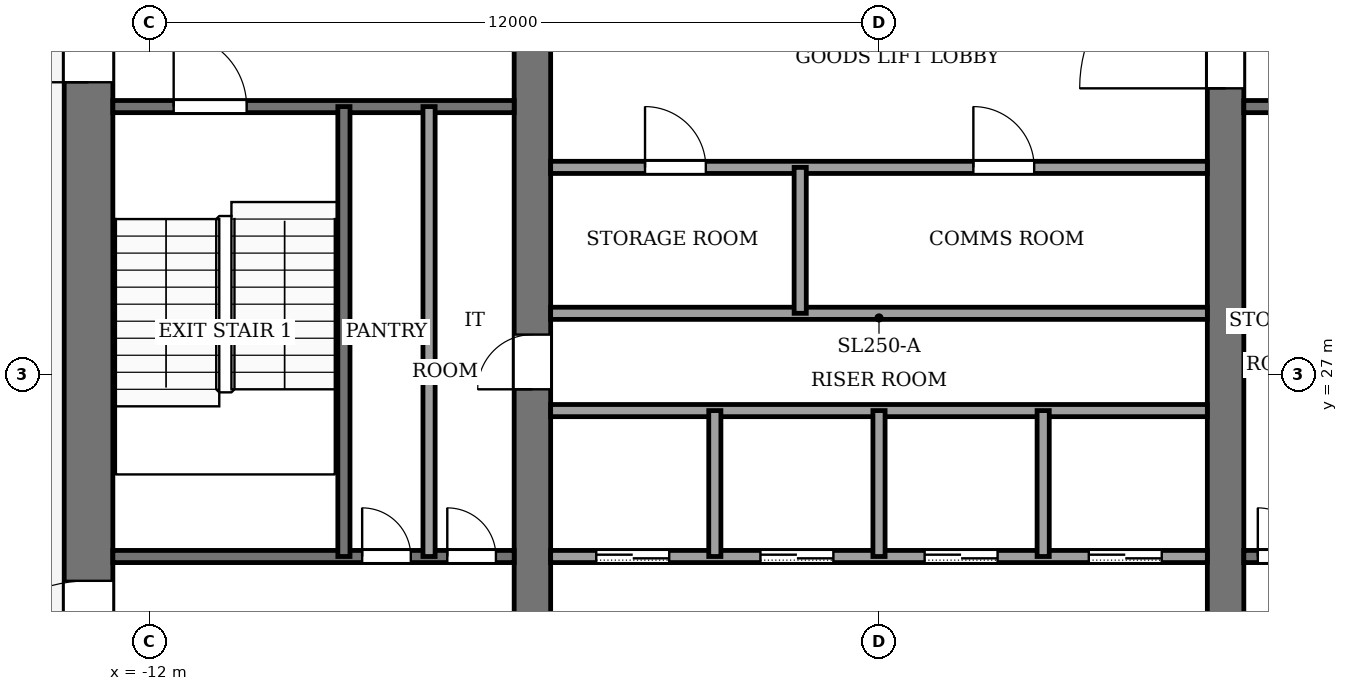
"""IFC4 building model, lengths in metres.
Left out: names, types, materials, properties, quantities, classifications, styles, units other than length and angle.
Written with IfcOpenShell. Run it as: python <this file> out.ifc"""

import sys

from ifc_helpers import new_model, si_unit, direction, frame, frame_2d, origin, place, context, subcontext, project, spatial, rectangle, extrude, element, fill, save


model = new_model("IFC4")
c1 = context("Model", 3, precision=1e-05, world=origin(), true_north=direction((0.0, 1.0)))
c2 = subcontext(c1, "Body", "Model", "MODEL_VIEW")
j1 = project(units=[si_unit("LENGTHUNIT", "METRE"), si_unit("PLANEANGLEUNIT", "RADIAN")], contexts=[c1])
p1 = place(None, origin())
s1 = spatial("IfcSite", under=j1, at=p1, CompositionType="ELEMENT")
p2 = place(p1, origin())
s2 = spatial("IfcBuilding", under=s1, at=p2, CompositionType="ELEMENT")
p3 = place(p2, frame((0.0, 0.0, 250.0)))
s3 = spatial("IfcBuildingStorey", under=s2, at=p3, CompositionType="ELEMENT", Elevation=250.0)
p4 = place(p3, frame((-13.0, 18.4, -0.13), z_axis=(0.0, 0.0, 1.0), x_axis=(0.0, 1.0, 0.0)))
e1 = element("IfcWall", 1, at=p4, inside=s3, PredefinedType="SHEAR", context=c2, shape_type="SweptSolid", body=[
    extrude(rectangle(XDim=19.2, YDim=0.8, at=frame_2d((9.6, 0.0))), origin(), (0.0, 0.0, 1.0), 4.0),
])
p5 = place(p4, frame((2.8, 0.0, 0.13)))
e2 = element("IfcOpeningElement", 2, at=p5, cuts=e1, PredefinedType="OPENING", context=c2, shape_type="SweptSolid", body=[
    extrude(rectangle(XDim=2.4, YDim=2.4, at=frame_2d((1.2, 1.2))), frame((0.0, 0.41, 0.0), z_axis=(0.0, -1.0, 0.0), x_axis=(1.0, 0.0, 0.0)), (0.0, 0.0, 1.0), 0.82),
])
p6 = place(p4, frame((13.4, 0.0, 0.13)))
e3 = element("IfcOpeningElement", 3, at=p6, cuts=e1, PredefinedType="OPENING", context=c2, shape_type="SweptSolid", body=[
    extrude(rectangle(XDim=1.4, YDim=2.2, at=frame_2d((0.7, 1.1))), frame((0.0, 0.41, 0.0), z_axis=(0.0, -1.0, 0.0), x_axis=(1.0, 0.0, 0.0)), (0.0, 0.0, 1.0), 0.82),
])
p7 = place(p3, frame((-5.7, 18.4, -0.13), z_axis=(0.0, 0.0, 1.0), x_axis=(0.0, 1.0, 0.0)))
e4 = element("IfcWall", 4, at=p7, inside=s3, PredefinedType="SHEAR", context=c2, shape_type="SweptSolid", body=[
    extrude(rectangle(XDim=19.2, YDim=0.6, at=frame_2d((9.6, 0.0))), origin(), (0.0, 0.0, 1.0), 4.0),
])
p8 = place(p7, frame((8.35, 0.0, 0.13)))
e5 = element("IfcOpeningElement", 5, at=p8, cuts=e4, PredefinedType="OPENING", context=c2, shape_type="SweptSolid", body=[
    extrude(rectangle(XDim=0.9, YDim=2.1, at=frame_2d((0.45, 1.05))), frame((0.0, 0.31, 0.0), z_axis=(0.0, -1.0, 0.0), x_axis=(1.0, 0.0, 0.0)), (0.0, 0.0, 1.0), 0.62),
])
p9 = place(p3, frame((5.7, 18.4, -0.13), z_axis=(0.0, 0.0, 1.0), x_axis=(0.0, 1.0, 0.0)))
e6 = element("IfcWall", 6, at=p9, inside=s3, PredefinedType="SHEAR", context=c2, shape_type="SweptSolid", body=[
    extrude(rectangle(XDim=19.2, YDim=0.6, at=frame_2d((9.6, 0.0))), origin(), (0.0, 0.0, 1.0), 4.0),
])
p10 = place(p9, frame((13.3, 0.0, 0.13)))
e7 = element("IfcOpeningElement", 7, at=p10, cuts=e6, PredefinedType="OPENING", context=c2, shape_type="SweptSolid", body=[
    extrude(rectangle(XDim=2.4, YDim=2.4, at=frame_2d((1.2, 1.2))), frame((0.0, 0.31, 0.0), z_axis=(0.0, -1.0, 0.0), x_axis=(1.0, 0.0, 0.0)), (0.0, 0.0, 1.0), 0.62),
])
p11 = place(p3, frame((-12.6, 24.0, 0.0), z_axis=(0.0, 0.0, 1.0), x_axis=(1.0, 0.0, 0.0)))
e8 = element("IfcWall", 8, at=p11, inside=s3, PredefinedType="PARTITIONING", context=c2, shape_type="SweptSolid", body=[
    extrude(rectangle(XDim=6.6, YDim=0.2, at=frame_2d((3.3, 0.0))), origin(), (0.0, 0.0, 1.0), 3.87),
])
p12 = place(p11, frame((4.1, 0.0, 0.0)))
e9 = element("IfcOpeningElement", 9, at=p12, cuts=e8, PredefinedType="OPENING", context=c2, shape_type="SweptSolid", body=[
    extrude(rectangle(XDim=0.8, YDim=2.1, at=frame_2d((0.4, 1.05))), frame((0.0, 0.11, 0.0), z_axis=(0.0, -1.0, 0.0), x_axis=(1.0, 0.0, 0.0)), (0.0, 0.0, 1.0), 0.22),
])
p13 = place(p11, frame((5.5, 0.0, 0.0)))
e10 = element("IfcOpeningElement", 10, at=p13, cuts=e8, PredefinedType="OPENING", context=c2, shape_type="SweptSolid", body=[
    extrude(rectangle(XDim=0.8, YDim=2.1, at=frame_2d((0.4, 1.05))), frame((0.0, 0.11, 0.0), z_axis=(0.0, -1.0, 0.0), x_axis=(1.0, 0.0, 0.0)), (0.0, 0.0, 1.0), 0.22),
])
p14 = place(p3, frame((-5.4, 24.0, 0.0), z_axis=(0.0, 0.0, 1.0), x_axis=(1.0, 0.0, 0.0)))
e11 = element("IfcWall", 11, at=p14, inside=s3, PredefinedType="PARTITIONING", context=c2, shape_type="SweptSolid", body=[
    extrude(rectangle(XDim=10.8, YDim=0.2, at=frame_2d((5.4, 0.0))), origin(), (0.0, 0.0, 1.0), 3.87),
])
p15 = place(p14, frame((0.75, 0.0, 0.0)))
e12 = element("IfcOpeningElement", 12, at=p15, cuts=e11, PredefinedType="OPENING", context=c2, shape_type="SweptSolid", body=[
    extrude(rectangle(XDim=1.2, YDim=2.2, at=frame_2d((0.6, 1.1))), frame((0.0, 0.11, 0.0), z_axis=(0.0, -1.0, 0.0), x_axis=(1.0, 0.0, 0.0)), (0.0, 0.0, 1.0), 0.22),
])
p16 = place(p14, frame((3.45, 0.0, 0.0)))
e13 = element("IfcOpeningElement", 13, at=p16, cuts=e11, PredefinedType="OPENING", context=c2, shape_type="SweptSolid", body=[
    extrude(rectangle(XDim=1.2, YDim=2.2, at=frame_2d((0.6, 1.1))), frame((0.0, 0.11, 0.0), z_axis=(0.0, -1.0, 0.0), x_axis=(1.0, 0.0, 0.0)), (0.0, 0.0, 1.0), 0.22),
])
p17 = place(p14, frame((6.15, 0.0, 0.0)))
e14 = element("IfcOpeningElement", 14, at=p17, cuts=e11, PredefinedType="OPENING", context=c2, shape_type="SweptSolid", body=[
    extrude(rectangle(XDim=1.2, YDim=2.2, at=frame_2d((0.6, 1.1))), frame((0.0, 0.11, 0.0), z_axis=(0.0, -1.0, 0.0), x_axis=(1.0, 0.0, 0.0)), (0.0, 0.0, 1.0), 0.22),
])
p18 = place(p14, frame((8.85, 0.0, 0.0)))
e15 = element("IfcOpeningElement", 15, at=p18, cuts=e11, PredefinedType="OPENING", context=c2, shape_type="SweptSolid", body=[
    extrude(rectangle(XDim=1.2, YDim=2.2, at=frame_2d((0.6, 1.1))), frame((0.0, 0.11, 0.0), z_axis=(0.0, -1.0, 0.0), x_axis=(1.0, 0.0, 0.0)), (0.0, 0.0, 1.0), 0.22),
])
p19 = place(p3, frame((6.0, 24.0, 0.0), z_axis=(0.0, 0.0, 1.0), x_axis=(1.0, 0.0, 0.0)))
e16 = element("IfcWall", 16, at=p19, inside=s3, PredefinedType="PARTITIONING", context=c2, shape_type="SweptSolid", body=[
    extrude(rectangle(XDim=6.6, YDim=0.2, at=frame_2d((3.3, 0.0))), origin(), (0.0, 0.0, 1.0), 3.87),
])
p20 = place(p19, frame((0.23, 0.0, 0.0)))
e17 = element("IfcOpeningElement", 17, at=p20, cuts=e16, PredefinedType="OPENING", context=c2, shape_type="SweptSolid", body=[
    extrude(rectangle(XDim=0.8, YDim=2.1, at=frame_2d((0.4, 1.05))), frame((0.0, 0.11, 0.0), z_axis=(0.0, -1.0, 0.0), x_axis=(1.0, 0.0, 0.0)), (0.0, 0.0, 1.0), 0.22),
])
p21 = place(p19, frame((1.53, 0.0, 0.0)))
e18 = element("IfcOpeningElement", 18, at=p21, cuts=e16, PredefinedType="OPENING", context=c2, shape_type="SweptSolid", body=[
    extrude(rectangle(XDim=1.0, YDim=2.1, at=frame_2d((0.5, 1.05))), frame((0.0, 0.11, 0.0), z_axis=(0.0, -1.0, 0.0), x_axis=(1.0, 0.0, 0.0)), (0.0, 0.0, 1.0), 0.22),
])
p22 = place(p19, frame((4.4, 0.0, 0.0)))
e19 = element("IfcOpeningElement", 19, at=p22, cuts=e16, PredefinedType="OPENING", context=c2, shape_type="SweptSolid", body=[
    extrude(rectangle(XDim=1.2, YDim=2.2, at=frame_2d((0.6, 1.1))), frame((0.0, 0.11, 0.0), z_axis=(0.0, -1.0, 0.0), x_axis=(1.0, 0.0, 0.0)), (0.0, 0.0, 1.0), 0.22),
])
for number, where, z_axis, x_axis in (
    (20, (-5.4, 26.4, 0.0), (0.0, 0.0, 1.0), (1.0, 0.0, 0.0)),
    (21, (-5.4, 28.0, 0.0), (0.0, 0.0, 1.0), (1.0, 0.0, 0.0)),
):
    element("IfcWall", number, at=place(p3, frame(where, z_axis=z_axis, x_axis=x_axis)), inside=s3, PredefinedType="PARTITIONING", context=c2, shape_type="SweptSolid", body=[
        extrude(rectangle(XDim=10.8, YDim=0.2, at=frame_2d((5.4, 0.0))), origin(), (0.0, 0.0, 1.0), 3.87),
    ])
p23 = place(p3, frame((-5.4, 30.4, 0.0), z_axis=(0.0, 0.0, 1.0), x_axis=(1.0, 0.0, 0.0)))
e22 = element("IfcWall", 22, at=p23, inside=s3, PredefinedType="PARTITIONING", context=c2, shape_type="SweptSolid", body=[
    extrude(rectangle(XDim=10.8, YDim=0.2, at=frame_2d((5.4, 0.0))), origin(), (0.0, 0.0, 1.0), 3.87),
])
p24 = place(p23, frame((1.552, 0.0, 0.0)))
e23 = element("IfcOpeningElement", 23, at=p24, cuts=e22, PredefinedType="OPENING", context=c2, shape_type="SweptSolid", body=[
    extrude(rectangle(XDim=1.0, YDim=2.1, at=frame_2d((0.5, 1.05))), frame((0.0, 0.11, 0.0), z_axis=(0.0, -1.0, 0.0), x_axis=(1.0, 0.0, 0.0)), (0.0, 0.0, 1.0), 0.22),
])
p25 = place(p23, frame((6.952, 0.0, 0.0)))
e24 = element("IfcOpeningElement", 24, at=p25, cuts=e22, PredefinedType="OPENING", context=c2, shape_type="SweptSolid", body=[
    extrude(rectangle(XDim=1.0, YDim=2.1, at=frame_2d((0.5, 1.05))), frame((0.0, 0.11, 0.0), z_axis=(0.0, -1.0, 0.0), x_axis=(1.0, 0.0, 0.0)), (0.0, 0.0, 1.0), 0.22),
])
p26 = place(p3, frame((-12.6, 31.4, 0.0), z_axis=(0.0, 0.0, 1.0), x_axis=(1.0, 0.0, 0.0)))
e25 = element("IfcWall", 25, at=p26, inside=s3, PredefinedType="PARTITIONING", context=c2, shape_type="SweptSolid", body=[
    extrude(rectangle(XDim=6.6, YDim=0.2, at=frame_2d((3.3, 0.0))), origin(), (0.0, 0.0, 1.0), 3.87),
])
p27 = place(p26, frame((1.0, 0.0, 0.0)))
e26 = element("IfcOpeningElement", 26, at=p27, cuts=e25, PredefinedType="OPENING", context=c2, shape_type="SweptSolid", body=[
    extrude(rectangle(XDim=1.2, YDim=2.2, at=frame_2d((0.6, 1.1))), frame((0.0, 0.11, 0.0), z_axis=(0.0, -1.0, 0.0), x_axis=(1.0, 0.0, 0.0)), (0.0, 0.0, 1.0), 0.22),
])
p28 = place(p3, frame((6.0, 31.4, 0.0), z_axis=(0.0, 0.0, 1.0), x_axis=(1.0, 0.0, 0.0)))
e27 = element("IfcWall", 27, at=p28, inside=s3, PredefinedType="PARTITIONING", context=c2, shape_type="SweptSolid", body=[
    extrude(rectangle(XDim=6.6, YDim=0.2, at=frame_2d((3.3, 0.0))), origin(), (0.0, 0.0, 1.0), 3.87),
])
for number, where, z_axis, x_axis in (
    (28, (-8.8, 24.0, 0.0), (0.0, 0.0, 1.0), (0.0, 1.0, 0.0)),
    (29, (-7.4, 24.0, 0.0), (0.0, 0.0, 1.0), (0.0, 1.0, 0.0)),
):
    element("IfcWall", number, at=place(p3, frame(where, z_axis=z_axis, x_axis=x_axis)), inside=s3, PredefinedType="PARTITIONING", context=c2, shape_type="SweptSolid", body=[
        extrude(rectangle(XDim=7.4, YDim=0.2, at=frame_2d((3.7, 0.0))), origin(), (0.0, 0.0, 1.0), 3.87),
    ])
for number, where, z_axis, x_axis in (
    (30, (-2.7, 24.0, 0.0), (0.0, 0.0, 1.0), (0.0, 1.0, 0.0)),
    (31, (-1.296, 28.0, 0.0), (0.0, 0.0, 1.0), (0.0, 1.0, 0.0)),
    (32, (0.0, 24.0, 0.0), (0.0, 0.0, 1.0), (0.0, 1.0, 0.0)),
    (33, (2.7, 24.0, 0.0), (0.0, 0.0, 1.0), (0.0, 1.0, 0.0)),
):
    element("IfcWall", number, at=place(p3, frame(where, z_axis=z_axis, x_axis=x_axis)), inside=s3, PredefinedType="PARTITIONING", context=c2, shape_type="SweptSolid", body=[
        extrude(rectangle(XDim=2.4, YDim=0.2, at=frame_2d((1.2, 0.0))), origin(), (0.0, 0.0, 1.0), 3.87),
    ])
p29 = place(p15, origin())
e34 = element("IfcDoor", 34, at=p29, inside=s3, OperationType="SLIDING_TO_LEFT", PredefinedType="DOOR", context=c2, shape_type="SweptSolid", body=[
    extrude(rectangle(XDim=1.2, YDim=2.2, at=frame_2d((0.6, 1.1))), frame((0.0, 0.025, 0.0), z_axis=(0.0, -1.0, 0.0), x_axis=(1.0, 0.0, 0.0)), (0.0, 0.0, 1.0), 0.05),
])
fill(e12, e34)
p30 = place(p16, origin())
e35 = element("IfcDoor", 35, at=p30, inside=s3, OperationType="SLIDING_TO_LEFT", PredefinedType="DOOR", context=c2, shape_type="SweptSolid", body=[
    extrude(rectangle(XDim=1.2, YDim=2.2, at=frame_2d((0.6, 1.1))), frame((0.0, 0.025, 0.0), z_axis=(0.0, -1.0, 0.0), x_axis=(1.0, 0.0, 0.0)), (0.0, 0.0, 1.0), 0.05),
])
fill(e13, e35)
p31 = place(p17, origin())
e36 = element("IfcDoor", 36, at=p31, inside=s3, OperationType="SLIDING_TO_LEFT", PredefinedType="DOOR", context=c2, shape_type="SweptSolid", body=[
    extrude(rectangle(XDim=1.2, YDim=2.2, at=frame_2d((0.6, 1.1))), frame((0.0, 0.025, 0.0), z_axis=(0.0, -1.0, 0.0), x_axis=(1.0, 0.0, 0.0)), (0.0, 0.0, 1.0), 0.05),
])
fill(e14, e36)
p32 = place(p18, origin())
e37 = element("IfcDoor", 37, at=p32, inside=s3, OperationType="SLIDING_TO_LEFT", PredefinedType="DOOR", context=c2, shape_type="SweptSolid", body=[
    extrude(rectangle(XDim=1.2, YDim=2.2, at=frame_2d((0.6, 1.1))), frame((0.0, 0.025, 0.0), z_axis=(0.0, -1.0, 0.0), x_axis=(1.0, 0.0, 0.0)), (0.0, 0.0, 1.0), 0.05),
])
fill(e15, e37)
p33 = place(p24, origin())
e38 = element("IfcDoor", 38, at=p33, inside=s3, OperationType="SINGLE_SWING_LEFT", PredefinedType="DOOR", context=c2, shape_type="SweptSolid", body=[
    extrude(rectangle(XDim=1.0, YDim=2.1, at=frame_2d((0.5, 1.05))), frame((0.0, 0.025, 0.0), z_axis=(0.0, -1.0, 0.0), x_axis=(1.0, 0.0, 0.0)), (0.0, 0.0, 1.0), 0.05),
])
fill(e23, e38)
p34 = place(p25, origin())
e39 = element("IfcDoor", 39, at=p34, inside=s3, OperationType="SINGLE_SWING_RIGHT", PredefinedType="DOOR", context=c2, shape_type="SweptSolid", body=[
    extrude(rectangle(XDim=1.0, YDim=2.1, at=frame_2d((0.5, 1.05))), frame((0.0, 0.025, 0.0), z_axis=(0.0, -1.0, 0.0), x_axis=(1.0, 0.0, 0.0)), (0.0, 0.0, 1.0), 0.05),
])
fill(e24, e39)
p35 = place(p12, origin())
e40 = element("IfcDoor", 40, at=p35, inside=s3, OperationType="SINGLE_SWING_LEFT", PredefinedType="DOOR", context=c2, shape_type="SweptSolid", body=[
    extrude(rectangle(XDim=0.8, YDim=2.1, at=frame_2d((0.4, 1.05))), frame((0.0, 0.025, 0.0), z_axis=(0.0, -1.0, 0.0), x_axis=(1.0, 0.0, 0.0)), (0.0, 0.0, 1.0), 0.05),
])
fill(e9, e40)
p36 = place(p13, origin())
e41 = element("IfcDoor", 41, at=p36, inside=s3, OperationType="SINGLE_SWING_RIGHT", PredefinedType="DOOR", context=c2, shape_type="SweptSolid", body=[
    extrude(rectangle(XDim=0.8, YDim=2.1, at=frame_2d((0.4, 1.05))), frame((0.0, 0.025, 0.0), z_axis=(0.0, -1.0, 0.0), x_axis=(1.0, 0.0, 0.0)), (0.0, 0.0, 1.0), 0.05),
])
fill(e10, e41)
p37 = place(p20, origin())
e42 = element("IfcDoor", 42, at=p37, inside=s3, OperationType="SINGLE_SWING_RIGHT", PredefinedType="DOOR", context=c2, shape_type="SweptSolid", body=[
    extrude(rectangle(XDim=0.8, YDim=2.1, at=frame_2d((0.4, 1.05))), frame((0.0, 0.025, 0.0), z_axis=(0.0, -1.0, 0.0), x_axis=(1.0, 0.0, 0.0)), (0.0, 0.0, 1.0), 0.05),
])
fill(e17, e42)
p38 = place(p8, origin())
e43 = element("IfcDoor", 43, at=p38, inside=s3, OperationType="SINGLE_SWING_RIGHT", PredefinedType="DOOR", context=c2, shape_type="SweptSolid", body=[
    extrude(rectangle(XDim=0.9, YDim=2.1, at=frame_2d((0.45, 1.05))), frame((0.0, 0.025, 0.0), z_axis=(0.0, -1.0, 0.0), x_axis=(1.0, 0.0, 0.0)), (0.0, 0.0, 1.0), 0.05),
])
fill(e5, e43)
p39 = place(p27, origin())
e44 = element("IfcDoor", 44, at=p39, inside=s3, OperationType="SINGLE_SWING_RIGHT", PredefinedType="DOOR", context=c2, shape_type="SweptSolid", body=[
    extrude(rectangle(XDim=1.2, YDim=2.2, at=frame_2d((0.6, 1.1))), frame((0.0, 0.025, 0.0), z_axis=(0.0, -1.0, 0.0), x_axis=(1.0, 0.0, 0.0)), (0.0, 0.0, 1.0), 0.05),
])
fill(e26, e44)
p40 = place(p10, origin())
e45 = element("IfcDoor", 45, at=p40, inside=s3, OperationType="DOUBLE_DOOR_SINGLE_SWING", PredefinedType="DOOR", context=c2, shape_type="SweptSolid", body=[
    extrude(rectangle(XDim=2.4, YDim=2.4, at=frame_2d((1.2, 1.2))), frame((0.0, 0.025, 0.0), z_axis=(0.0, -1.0, 0.0), x_axis=(1.0, 0.0, 0.0)), (0.0, 0.0, 1.0), 0.05),
])
fill(e7, e45)
p41 = place(p5, origin())
e46 = element("IfcDoor", 46, at=p41, inside=s3, OperationType="DOUBLE_DOOR_SINGLE_SWING", PredefinedType="DOOR", context=c2, shape_type="SweptSolid", body=[
    extrude(rectangle(XDim=2.4, YDim=2.4, at=frame_2d((1.2, 1.2))), frame((0.0, 0.025, 0.0), z_axis=(0.0, -1.0, 0.0), x_axis=(1.0, 0.0, 0.0)), (0.0, 0.0, 1.0), 0.05),
])
fill(e2, e46)
p42 = place(p6, origin())
e47 = element("IfcDoor", 47, at=p42, inside=s3, OperationType="SINGLE_SWING_RIGHT", PredefinedType="DOOR", context=c2, shape_type="SweptSolid", body=[
    extrude(rectangle(XDim=1.4, YDim=2.2, at=frame_2d((0.7, 1.1))), frame((0.0, 0.025, 0.0), z_axis=(0.0, -1.0, 0.0), x_axis=(1.0, 0.0, 0.0)), (0.0, 0.0, 1.0), 0.05),
])
fill(e3, e47)
save(model, sys.argv[1])
